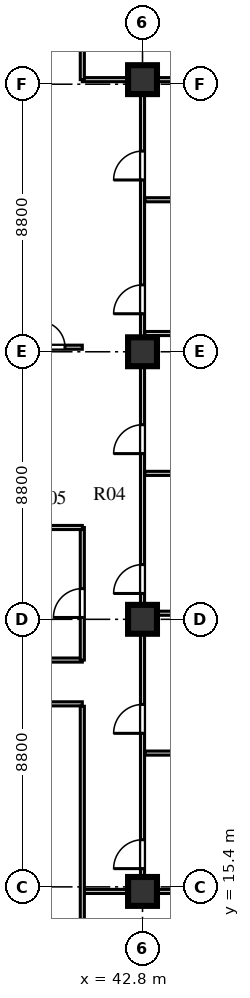
"""IFC4 building model, lengths in metres.
Left out: names, types, materials, properties, quantities, classifications, styles, units other than length and angle.
Written with IfcOpenShell. Run it as: python <this file> out.ifc"""

import sys

from ifc_helpers import new_model, si_unit, direction, frame, frame_2d, origin, origin_2d, place, context, subcontext, project, spatial, rectangle, extrude, element, fill, save


model = new_model("IFC4")
c1 = context("Model", 3, precision=1e-05, world=origin(), true_north=direction((0.0, 1.0)))
c2 = subcontext(c1, "Body", "Model", "MODEL_VIEW")
j1 = project(units=[si_unit("LENGTHUNIT", "METRE"), si_unit("PLANEANGLEUNIT", "RADIAN")], contexts=[c1])
p1 = place(None, origin())
s1 = spatial("IfcSite", under=j1, at=p1, CompositionType="ELEMENT")
p2 = place(p1, origin())
s2 = spatial("IfcBuilding", under=s1, at=p2, CompositionType="ELEMENT")
p3 = place(p2, frame((0.0, 0.0, 188.7)))
s3 = spatial("IfcBuildingStorey", under=s2, at=p3, CompositionType="ELEMENT", Elevation=188.7)
for number, where, z_axis, x_axis in (
    (1, (42.8, 15.25, 0.0), (0.0, 0.0, 1.0), (1.0, 0.0, 0.0)),
    (2, (42.8, 24.2, 0.0), (0.0, 0.0, 1.0), (1.0, 0.0, 0.0)),
    (3, (42.8, 33.0, 0.0), (0.0, 0.0, 1.0), (1.0, 0.0, 0.0)),
    (4, (42.8, 41.95, 0.0), (0.0, 0.0, 1.0), (1.0, 0.0, 0.0)),
):
    element("IfcColumn", number, at=place(p3, frame(where, z_axis=z_axis, x_axis=x_axis)), inside=s3, PredefinedType="COLUMN", context=c2, shape_type="SweptSolid", body=[
        extrude(rectangle(XDim=0.95, YDim=0.95, at=origin_2d()), origin(), (0.0, 0.0, 1.0), 3.6),
    ])
p4 = place(p3, frame((25.22, 21.42, 0.0), z_axis=(0.0, 0.0, 1.0), x_axis=(1.0, 0.0, 0.0)))
e5 = element("IfcWall", 5, at=p4, inside=s3, PredefinedType="PARTITIONING", context=c2, shape_type="SweptSolid", body=[
    extrude(rectangle(XDim=15.6, YDim=0.135, at=frame_2d((7.8, 0.0))), origin(), (0.0, 0.0, 1.0), 3.25),
])
p5 = place(p4, frame((0.73, 0.0, 0.0)))
e6 = element("IfcOpeningElement", 6, at=p5, cuts=e5, PredefinedType="OPENING", context=c2, shape_type="SweptSolid", body=[
    extrude(rectangle(XDim=0.95, YDim=2.1, at=frame_2d((0.475, 1.05))), frame((0.0, 0.078, 0.0), z_axis=(0.0, -1.0, 0.0), x_axis=(1.0, 0.0, 0.0)), (0.0, 0.0, 1.0), 0.155),
])
p6 = place(p4, frame((9.43, 0.0, 0.0)))
e7 = element("IfcOpeningElement", 7, at=p6, cuts=e5, PredefinedType="OPENING", context=c2, shape_type="SweptSolid", body=[
    extrude(rectangle(XDim=0.95, YDim=2.1, at=frame_2d((0.475, 1.05))), frame((0.0, 0.078, 0.0), z_axis=(0.0, -1.0, 0.0), x_axis=(1.0, 0.0, 0.0)), (0.0, 0.0, 1.0), 0.155),
])
p7 = place(p3, frame((27.15, 22.86, 0.0), z_axis=(0.0, 0.0, 1.0), x_axis=(1.0, 0.0, 0.0)))
e8 = element("IfcWall", 8, at=p7, inside=s3, PredefinedType="PARTITIONING", context=c2, shape_type="SweptSolid", body=[
    extrude(rectangle(XDim=13.67, YDim=0.135, at=frame_2d((6.835, 0.0))), origin(), (0.0, 0.0, 1.0), 3.6),
])
p8 = place(p7, frame((2.2, 0.0, 0.0)))
e9 = element("IfcOpeningElement", 9, at=p8, cuts=e8, PredefinedType="OPENING", context=c2, shape_type="SweptSolid", body=[
    extrude(rectangle(XDim=0.9, YDim=2.08, at=frame_2d((0.45, 1.04))), frame((0.0, 0.078, 0.0), z_axis=(0.0, -1.0, 0.0), x_axis=(1.0, 0.0, 0.0)), (0.0, 0.0, 1.0), 0.155),
])
p9 = place(p3, frame((42.8, 15.25, 0.0), z_axis=(0.0, 0.0, 1.0), x_axis=(0.0, 1.0, 0.0)))
e10 = element("IfcWall", 10, at=p9, inside=s3, PredefinedType="PARTITIONING", context=c2, shape_type="SweptSolid", body=[
    extrude(rectangle(XDim=26.7, YDim=0.135, at=frame_2d((13.35, 0.0))), origin(), (0.0, 0.0, 1.0), 2.95),
])
p10 = place(p9, frame((0.75, 0.0, 0.0)))
e11 = element("IfcOpeningElement", 11, at=p10, cuts=e10, PredefinedType="OPENING", context=c2, shape_type="SweptSolid", body=[
    extrude(rectangle(XDim=0.95, YDim=2.1, at=frame_2d((0.475, 1.05))), frame((0.0, 0.078, 0.0), z_axis=(0.0, -1.0, 0.0), x_axis=(1.0, 0.0, 0.0)), (0.0, 0.0, 1.0), 0.155),
])
p11 = place(p9, frame((5.2, 0.0, 0.0)))
e12 = element("IfcOpeningElement", 12, at=p11, cuts=e10, PredefinedType="OPENING", context=c2, shape_type="SweptSolid", body=[
    extrude(rectangle(XDim=0.95, YDim=2.1, at=frame_2d((0.475, 1.05))), frame((0.0, 0.078, 0.0), z_axis=(0.0, -1.0, 0.0), x_axis=(1.0, 0.0, 0.0)), (0.0, 0.0, 1.0), 0.155),
])
p12 = place(p9, frame((9.8, 0.0, 0.0)))
e13 = element("IfcOpeningElement", 13, at=p12, cuts=e10, PredefinedType="OPENING", context=c2, shape_type="SweptSolid", body=[
    extrude(rectangle(XDim=0.95, YDim=2.1, at=frame_2d((0.475, 1.05))), frame((0.0, 0.078, 0.0), z_axis=(0.0, -1.0, 0.0), x_axis=(1.0, 0.0, 0.0)), (0.0, 0.0, 1.0), 0.155),
])
p13 = place(p9, frame((14.4, 0.0, 0.0)))
e14 = element("IfcOpeningElement", 14, at=p13, cuts=e10, PredefinedType="OPENING", context=c2, shape_type="SweptSolid", body=[
    extrude(rectangle(XDim=0.95, YDim=2.1, at=frame_2d((0.475, 1.05))), frame((0.0, 0.078, 0.0), z_axis=(0.0, -1.0, 0.0), x_axis=(1.0, 0.0, 0.0)), (0.0, 0.0, 1.0), 0.155),
])
p14 = place(p9, frame((19.0, 0.0, 0.0)))
e15 = element("IfcOpeningElement", 15, at=p14, cuts=e10, PredefinedType="OPENING", context=c2, shape_type="SweptSolid", body=[
    extrude(rectangle(XDim=0.95, YDim=2.1, at=frame_2d((0.475, 1.05))), frame((0.0, 0.078, 0.0), z_axis=(0.0, -1.0, 0.0), x_axis=(1.0, 0.0, 0.0)), (0.0, 0.0, 1.0), 0.155),
])
p15 = place(p9, frame((23.4, 0.0, 0.0)))
e16 = element("IfcOpeningElement", 16, at=p15, cuts=e10, PredefinedType="OPENING", context=c2, shape_type="SweptSolid", body=[
    extrude(rectangle(XDim=0.95, YDim=2.1, at=frame_2d((0.475, 1.05))), frame((0.0, 0.078, 0.0), z_axis=(0.0, -1.0, 0.0), x_axis=(1.0, 0.0, 0.0)), (0.0, 0.0, 1.0), 0.155),
])
for number, where, z_axis, x_axis in (
    (17, (40.82, 15.25, 0.0), (0.0, 0.0, 1.0), (1.0, 0.0, 0.0)),
    (18, (40.82, 41.95, 0.0), (0.0, 0.0, 1.0), (1.0, 0.0, 0.0)),
):
    element("IfcWall", number, at=place(p3, frame(where, z_axis=z_axis, x_axis=x_axis)), inside=s3, PredefinedType="PARTITIONING", context=c2, shape_type="SweptSolid", body=[
        extrude(rectangle(XDim=9.7, YDim=0.135, at=frame_2d((4.85, 0.0))), origin(), (0.0, 0.0, 1.0), 2.95),
    ])
p16 = place(p3, frame((40.82, 22.86, 0.0), z_axis=(0.0, 0.0, 1.0), x_axis=(0.0, 1.0, 0.0)))
e19 = element("IfcWall", 19, at=p16, inside=s3, PredefinedType="PARTITIONING", context=c2, shape_type="SweptSolid", body=[
    extrude(rectangle(XDim=4.36, YDim=0.135, at=frame_2d((2.18, 0.0))), origin(), (0.0, 0.0, 1.0), 3.6),
])
p17 = place(p16, frame((1.4, 0.0, 0.0)))
e20 = element("IfcOpeningElement", 20, at=p17, cuts=e19, PredefinedType="OPENING", context=c2, shape_type="SweptSolid", body=[
    extrude(rectangle(XDim=0.95, YDim=2.1, at=frame_2d((0.475, 1.05))), frame((0.0, 0.078, 0.0), z_axis=(0.0, -1.0, 0.0), x_axis=(1.0, 0.0, 0.0)), (0.0, 0.0, 1.0), 0.155),
])
p18 = place(p3, frame((36.9, 27.22, 0.0), z_axis=(0.0, 0.0, 1.0), x_axis=(1.0, 0.0, 0.0)))
e21 = element("IfcWall", 21, at=p18, inside=s3, PredefinedType="PARTITIONING", context=c2, shape_type="SweptSolid", body=[
    extrude(rectangle(XDim=3.92, YDim=0.135, at=frame_2d((1.96, 0.0))), origin(), (0.0, 0.0, 1.0), 3.25),
])
p19 = place(p3, frame((40.82, 7.88, 0.0), z_axis=(0.0, 0.0, 1.0), x_axis=(0.0, 1.0, 0.0)))
e22 = element("IfcWall", 22, at=p19, inside=s3, PredefinedType="PARTITIONING", context=c2, shape_type="SweptSolid", body=[
    extrude(rectangle(XDim=13.46, YDim=0.135, at=frame_2d((6.73, 0.0))), origin(), (0.0, 0.0, 1.0), 3.6),
])
p20 = place(p3, frame((42.88, 19.8, 0.0), z_axis=(0.0, 0.0, 1.0), x_axis=(1.0, 0.0, 0.0)))
e23 = element("IfcWall", 23, at=p20, inside=s3, PredefinedType="PARTITIONING", context=c2, shape_type="SweptSolid", body=[
    extrude(rectangle(XDim=7.64, YDim=0.135, at=frame_2d((3.82, 0.0))), origin(), (0.0, 0.0, 1.0), 3.6),
])
p21 = place(p3, frame((42.88, 24.4, 0.0), z_axis=(0.0, 0.0, 1.0), x_axis=(1.0, 0.0, 0.0)))
e24 = element("IfcWall", 24, at=p21, inside=s3, PredefinedType="PARTITIONING", context=c2, shape_type="SweptSolid", body=[
    extrude(rectangle(XDim=7.64, YDim=0.135, at=frame_2d((3.82, 0.0))), origin(), (0.0, 0.0, 1.0), 3.15),
])
for number, where, z_axis, x_axis in (
    (25, (42.88, 29.0, 0.0), (0.0, 0.0, 1.0), (1.0, 0.0, 0.0)),
    (26, (42.88, 33.6, 0.0), (0.0, 0.0, 1.0), (1.0, 0.0, 0.0)),
    (27, (42.88, 38.0, 0.0), (0.0, 0.0, 1.0), (1.0, 0.0, 0.0)),
):
    element("IfcWall", number, at=place(p3, frame(where, z_axis=z_axis, x_axis=x_axis)), inside=s3, PredefinedType="PARTITIONING", context=c2, shape_type="SweptSolid", body=[
        extrude(rectangle(XDim=7.64, YDim=0.135, at=frame_2d((3.82, 0.0))), origin(), (0.0, 0.0, 1.0), 3.6),
    ])
p22 = place(p3, frame((38.95, 33.15, 0.0), z_axis=(0.0, 0.0, 1.0), x_axis=(1.0, 0.0, 0.0)))
e28 = element("IfcWall", 28, at=p22, inside=s3, PredefinedType="PARTITIONING", context=c2, shape_type="SweptSolid", body=[
    extrude(rectangle(XDim=1.87, YDim=0.135, at=frame_2d((0.935, 0.0))), origin(), (0.0, 0.0, 1.0), 3.6),
])
p23 = place(p22, frame((0.45, 0.0, 0.0)))
e29 = element("IfcOpeningElement", 29, at=p23, cuts=e28, PredefinedType="OPENING", context=c2, shape_type="SweptSolid", body=[
    extrude(rectangle(XDim=0.85, YDim=2.05, at=frame_2d((0.425, 1.025))), frame((0.0, 0.078, 0.0), z_axis=(0.0, -1.0, 0.0), x_axis=(1.0, 0.0, 0.0)), (0.0, 0.0, 1.0), 0.155),
])
p24 = place(p3, frame((40.82, 41.95, 0.0), z_axis=(0.0, 0.0, 1.0), x_axis=(0.0, 1.0, 0.0)))
e30 = element("IfcWall", 30, at=p24, inside=s3, PredefinedType="PARTITIONING", context=c2, shape_type="SweptSolid", body=[
    extrude(rectangle(XDim=7.37, YDim=0.135, at=frame_2d((3.685, 0.0))), origin(), (0.0, 0.0, 1.0), 3.6),
])
p25 = place(p17, frame((0.95, 0.0, 0.0), z_axis=(0.0, 0.0, 1.0), x_axis=(-1.0, 0.0, 0.0)))
e31 = element("IfcDoor", 31, at=p25, inside=s3, OperationType="SINGLE_SWING_RIGHT", PredefinedType="DOOR", context=c2, shape_type="SweptSolid", body=[
    extrude(rectangle(XDim=0.95, YDim=2.1, at=frame_2d((0.475, 1.05))), frame((0.0, 0.025, 0.0), z_axis=(0.0, -1.0, 0.0), x_axis=(1.0, 0.0, 0.0)), (0.0, 0.0, 1.0), 0.05),
])
fill(e20, e31)
p26 = place(p10, origin())
e32 = element("IfcDoor", 32, at=p26, inside=s3, OperationType="SINGLE_SWING_LEFT", PredefinedType="DOOR", context=c2, shape_type="SweptSolid", body=[
    extrude(rectangle(XDim=0.95, YDim=2.1, at=frame_2d((0.475, 1.05))), frame((0.0, 0.025, 0.0), z_axis=(0.0, -1.0, 0.0), x_axis=(1.0, 0.0, 0.0)), (0.0, 0.0, 1.0), 0.05),
])
fill(e11, e32)
p27 = place(p11, origin())
e33 = element("IfcDoor", 33, at=p27, inside=s3, OperationType="SINGLE_SWING_LEFT", PredefinedType="DOOR", context=c2, shape_type="SweptSolid", body=[
    extrude(rectangle(XDim=0.95, YDim=2.1, at=frame_2d((0.475, 1.05))), frame((0.0, 0.025, 0.0), z_axis=(0.0, -1.0, 0.0), x_axis=(1.0, 0.0, 0.0)), (0.0, 0.0, 1.0), 0.05),
])
fill(e12, e33)
p28 = place(p12, origin())
e34 = element("IfcDoor", 34, at=p28, inside=s3, OperationType="SINGLE_SWING_LEFT", PredefinedType="DOOR", context=c2, shape_type="SweptSolid", body=[
    extrude(rectangle(XDim=0.95, YDim=2.1, at=frame_2d((0.475, 1.05))), frame((0.0, 0.025, 0.0), z_axis=(0.0, -1.0, 0.0), x_axis=(1.0, 0.0, 0.0)), (0.0, 0.0, 1.0), 0.05),
])
fill(e13, e34)
p29 = place(p13, origin())
e35 = element("IfcDoor", 35, at=p29, inside=s3, OperationType="SINGLE_SWING_LEFT", PredefinedType="DOOR", context=c2, shape_type="SweptSolid", body=[
    extrude(rectangle(XDim=0.95, YDim=2.1, at=frame_2d((0.475, 1.05))), frame((0.0, 0.025, 0.0), z_axis=(0.0, -1.0, 0.0), x_axis=(1.0, 0.0, 0.0)), (0.0, 0.0, 1.0), 0.05),
])
fill(e14, e35)
p30 = place(p14, origin())
e36 = element("IfcDoor", 36, at=p30, inside=s3, OperationType="SINGLE_SWING_LEFT", PredefinedType="DOOR", context=c2, shape_type="SweptSolid", body=[
    extrude(rectangle(XDim=0.95, YDim=2.1, at=frame_2d((0.475, 1.05))), frame((0.0, 0.025, 0.0), z_axis=(0.0, -1.0, 0.0), x_axis=(1.0, 0.0, 0.0)), (0.0, 0.0, 1.0), 0.05),
])
fill(e15, e36)
p31 = place(p15, origin())
e37 = element("IfcDoor", 37, at=p31, inside=s3, OperationType="SINGLE_SWING_LEFT", PredefinedType="DOOR", context=c2, shape_type="SweptSolid", body=[
    extrude(rectangle(XDim=0.95, YDim=2.1, at=frame_2d((0.475, 1.05))), frame((0.0, 0.025, 0.0), z_axis=(0.0, -1.0, 0.0), x_axis=(1.0, 0.0, 0.0)), (0.0, 0.0, 1.0), 0.05),
])
fill(e16, e37)
p32 = place(p23, origin())
e38 = element("IfcDoor", 38, at=p32, inside=s3, OperationType="SINGLE_SWING_LEFT", PredefinedType="DOOR", context=c2, shape_type="SweptSolid", body=[
    extrude(rectangle(XDim=0.85, YDim=2.05, at=frame_2d((0.425, 1.025))), frame((0.0, 0.025, 0.0), z_axis=(0.0, -1.0, 0.0), x_axis=(1.0, 0.0, 0.0)), (0.0, 0.0, 1.0), 0.05),
])
fill(e29, e38)
save(model, sys.argv[1])
